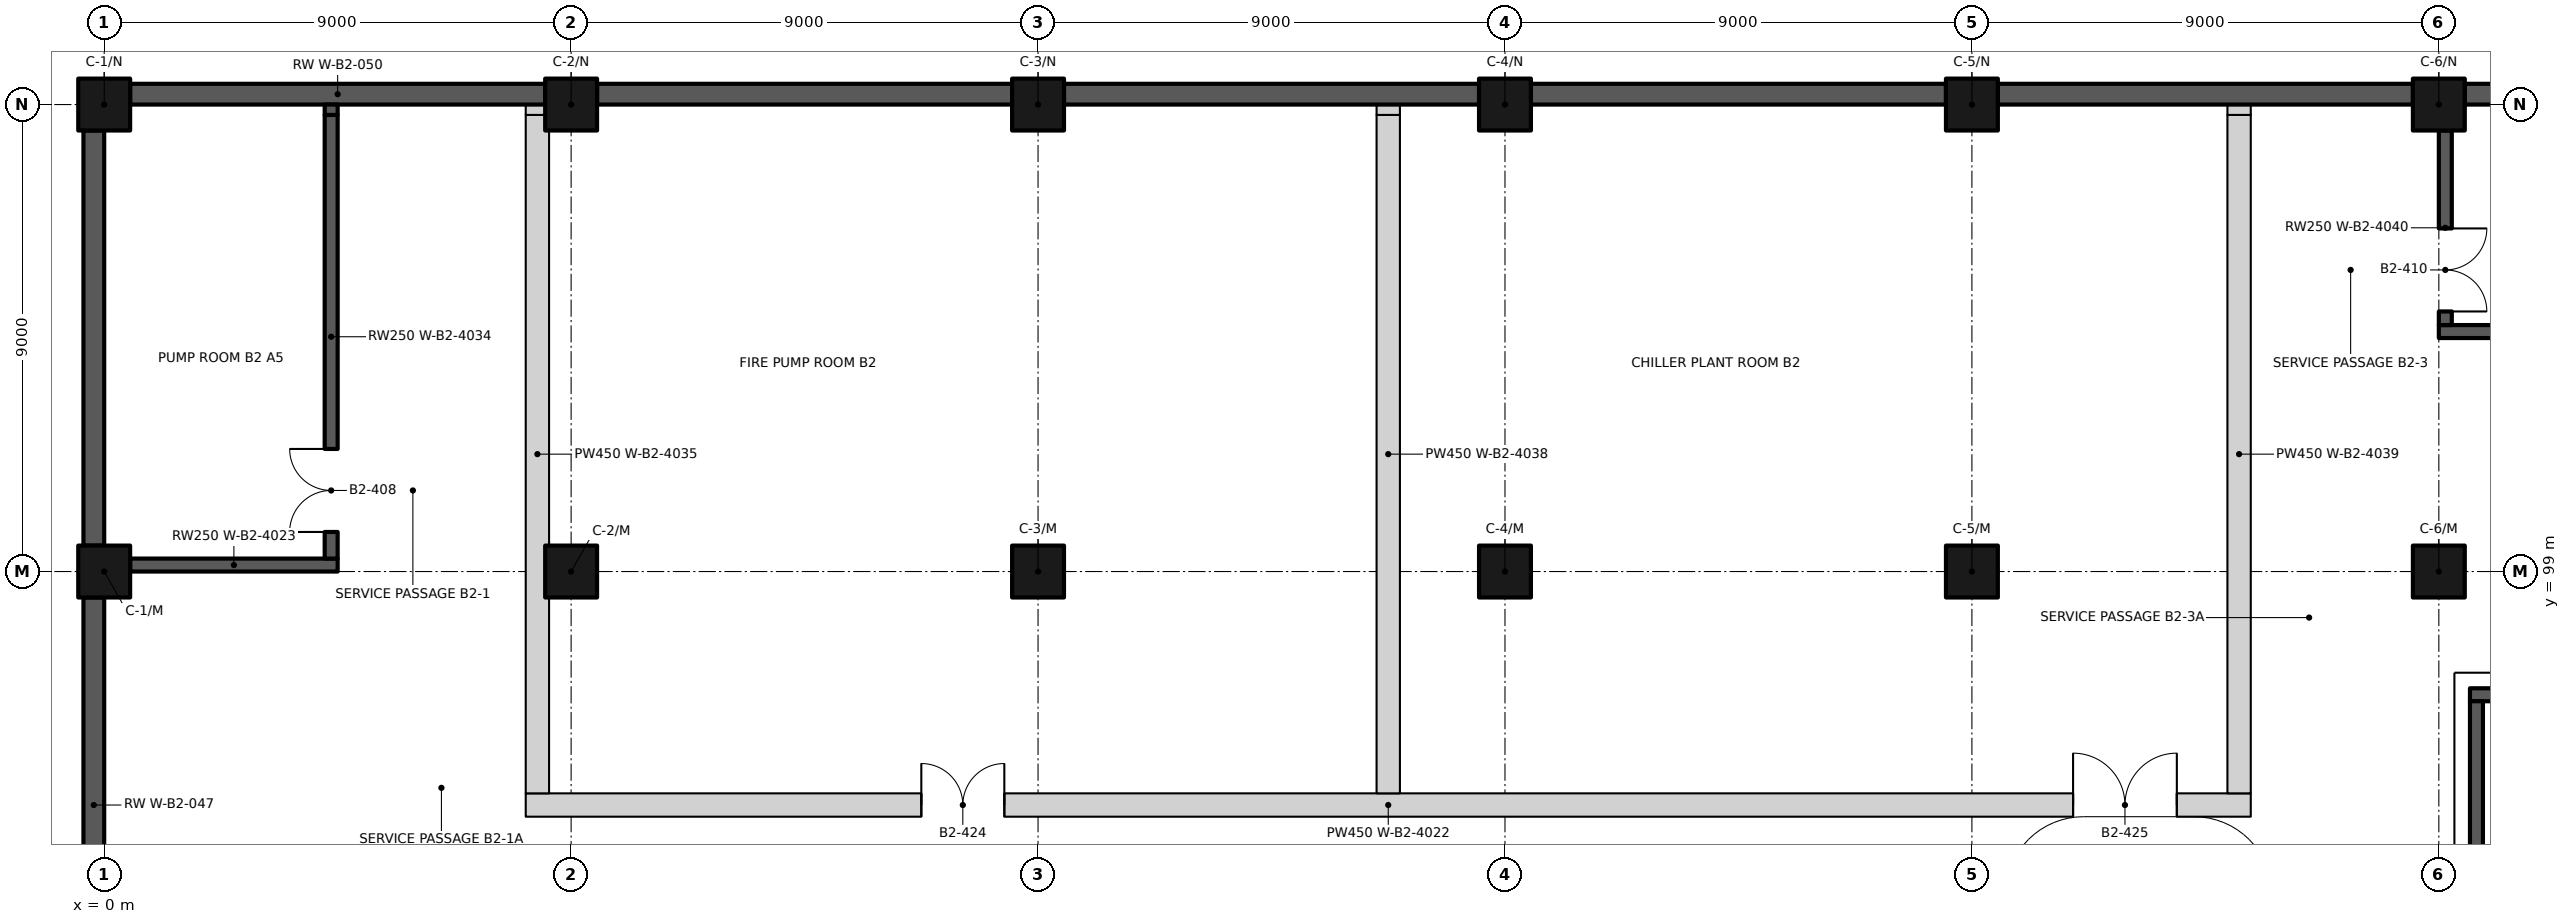
"""IFC4 building model, lengths in metres.
Left out: names, types, materials, properties, quantities, classifications, styles, units other than length and angle.
Written with IfcOpenShell. Run it as: python <this file> out.ifc"""

import sys

from ifc_helpers import new_model, si_unit, direction, frame, frame_2d, origin, origin_2d, place, context, subcontext, project, spatial, rectangle, extrude, element, fill, save


model = new_model("IFC4")
c1 = context("Model", 3, precision=1e-05, world=origin(), true_north=direction((0.0, 1.0)))
c2 = subcontext(c1, "Body", "Model", "MODEL_VIEW")
j1 = project(units=[si_unit("LENGTHUNIT", "METRE"), si_unit("PLANEANGLEUNIT", "RADIAN")], contexts=[c1])
p1 = place(None, origin())
s1 = spatial("IfcSite", under=j1, at=p1, CompositionType="ELEMENT")
p2 = place(p1, origin())
s2 = spatial("IfcBuilding", under=s1, at=p2, CompositionType="ELEMENT")
p3 = place(p2, frame((0.0, 0.0, -9.9)))
s3 = spatial("IfcBuildingStorey", under=s2, at=p3, CompositionType="ELEMENT", Elevation=-9.9)
for number, where, z_axis, x_axis in (
    (1, (-0.2, 90.5, -0.5), (0.0, 0.0, 1.0), (0.0, 1.0, 0.0)),
    (2, (-0.2, 99.5, -0.5), (0.0, 0.0, 1.0), (0.0, 1.0, 0.0)),
    (3, (0.5, 108.2, -0.5), (0.0, 0.0, 1.0), (1.0, 0.0, 0.0)),
    (4, (9.5, 108.2, -0.5), (0.0, 0.0, 1.0), (1.0, 0.0, 0.0)),
    (5, (18.5, 108.2, -0.5), (0.0, 0.0, 1.0), (1.0, 0.0, 0.0)),
    (6, (27.5, 108.2, -0.5), (0.0, 0.0, 1.0), (1.0, 0.0, 0.0)),
    (7, (36.5, 108.2, -0.5), (0.0, 0.0, 1.0), (1.0, 0.0, 0.0)),
    (8, (45.5, 108.2, -0.5), (0.0, 0.0, 1.0), (1.0, 0.0, 0.0)),
):
    element("IfcWall", number, at=place(p3, frame(where, z_axis=z_axis, x_axis=x_axis)), inside=s3, PredefinedType="SOLIDWALL", context=c2, shape_type="SweptSolid", body=[
        extrude(rectangle(XDim=8.0, YDim=0.4, at=frame_2d((4.0, 0.0))), origin(), (0.0, 0.0, 1.0), 5.3),
    ])
for number, where, z_axis, x_axis in (
    (9, (0.0, 99.0, 0.0), (0.0, 0.0, 1.0), (1.0, 0.0, 0.0)),
    (10, (9.0, 99.0, 0.0), (0.0, 0.0, 1.0), (1.0, 0.0, 0.0)),
    (11, (18.0, 99.0, 0.0), (0.0, 0.0, 1.0), (1.0, 0.0, 0.0)),
    (12, (27.0, 99.0, 0.0), (0.0, 0.0, 1.0), (1.0, 0.0, 0.0)),
    (13, (36.0, 99.0, 0.0), (0.0, 0.0, 1.0), (1.0, 0.0, 0.0)),
    (14, (45.0, 99.0, 0.0), (0.0, 0.0, 1.0), (1.0, 0.0, 0.0)),
    (15, (0.0, 108.0, 0.0), (0.0, 0.0, 1.0), (1.0, 0.0, 0.0)),
    (16, (9.0, 108.0, 0.0), (0.0, 0.0, 1.0), (1.0, 0.0, 0.0)),
    (17, (18.0, 108.0, 0.0), (0.0, 0.0, 1.0), (1.0, 0.0, 0.0)),
    (18, (27.0, 108.0, 0.0), (0.0, 0.0, 1.0), (1.0, 0.0, 0.0)),
    (19, (36.0, 108.0, 0.0), (0.0, 0.0, 1.0), (1.0, 0.0, 0.0)),
    (20, (45.0, 108.0, 0.0), (0.0, 0.0, 1.0), (1.0, 0.0, 0.0)),
):
    element("IfcColumn", number, at=place(p3, frame(where, z_axis=z_axis, x_axis=x_axis)), inside=s3, PredefinedType="COLUMN", context=c2, shape_type="SweptSolid", body=[
        extrude(rectangle(XDim=1.0, YDim=1.0, at=origin_2d()), origin(), (0.0, 0.0, 1.0), 4.8),
    ])
p4 = place(p3, frame((45.6, 96.625, -1.6), z_axis=(0.0, 0.0, 1.0), x_axis=(1.0, 0.0, 0.0)))
e21 = element("IfcWall", 21, at=p4, inside=s3, PredefinedType="SHEAR", context=c2, shape_type="SweptSolid", body=[
    extrude(rectangle(XDim=7.15, YDim=0.25, at=frame_2d((3.575, 0.0))), origin(), (0.0, 0.0, 1.0), 6.4),
])
p5 = place(p4, frame((1.15, 0.0, 1.6)))
e22 = element("IfcOpeningElement", 22, at=p5, cuts=e21, PredefinedType="OPENING", context=c2, shape_type="SweptSolid", body=[
    extrude(rectangle(XDim=1.4, YDim=2.1, at=frame_2d((0.7, 1.05))), frame((0.0, 0.135, 0.0), z_axis=(0.0, -1.0, 0.0), x_axis=(1.0, 0.0, 0.0)), (0.0, 0.0, 1.0), 0.27),
])
p6 = place(p4, frame((4.6, 0.0, 1.6)))
e23 = element("IfcOpeningElement", 23, at=p6, cuts=e21, PredefinedType="OPENING", context=c2, shape_type="SweptSolid", body=[
    extrude(rectangle(XDim=1.4, YDim=2.1, at=frame_2d((0.7, 1.05))), frame((0.0, 0.135, 0.0), z_axis=(0.0, -1.0, 0.0), x_axis=(1.0, 0.0, 0.0)), (0.0, 0.0, 1.0), 0.27),
])
p7 = place(p3, frame((45.725, 92.5, -1.6), z_axis=(0.0, 0.0, 1.0), x_axis=(0.0, 1.0, 0.0)))
e24 = element("IfcWall", 24, at=p7, inside=s3, PredefinedType="SHEAR", context=c2, shape_type="SweptSolid", body=[
    extrude(rectangle(XDim=4.0, YDim=0.25, at=frame_2d((2.0, 0.0))), origin(), (0.0, 0.0, 1.0), 6.4),
])
p8 = place(p3, frame((8.125, 94.5, 0.0), z_axis=(0.0, 0.0, 1.0), x_axis=(1.0, 0.0, 0.0)))
e25 = element("IfcWall", 25, at=p8, inside=s3, PredefinedType="SOLIDWALL", context=c2, shape_type="SweptSolid", body=[
    extrude(rectangle(XDim=33.25, YDim=0.45, at=frame_2d((16.625, 0.0))), origin(), (0.0, 0.0, 1.0), 4.5),
])
p9 = place(p8, frame((7.625, 0.0, 0.0)))
e26 = element("IfcOpeningElement", 26, at=p9, cuts=e25, PredefinedType="OPENING", context=c2, shape_type="SweptSolid", body=[
    extrude(rectangle(XDim=1.6, YDim=2.1, at=frame_2d((0.8, 1.05))), frame((0.0, 0.235, 0.0), z_axis=(0.0, -1.0, 0.0), x_axis=(1.0, 0.0, 0.0)), (0.0, 0.0, 1.0), 0.47),
])
p10 = place(p8, frame((29.825, 0.0, 0.0)))
e27 = element("IfcOpeningElement", 27, at=p10, cuts=e25, PredefinedType="OPENING", context=c2, shape_type="SweptSolid", body=[
    extrude(rectangle(XDim=2.0, YDim=2.4, at=frame_2d((1.0, 1.2))), frame((0.0, 0.235, 0.0), z_axis=(0.0, -1.0, 0.0), x_axis=(1.0, 0.0, 0.0)), (0.0, 0.0, 1.0), 0.47),
])
p11 = place(p3, frame((0.5, 99.125, 0.0), z_axis=(0.0, 0.0, 1.0), x_axis=(1.0, 0.0, 0.0)))
e28 = element("IfcWall", 28, at=p11, inside=s3, PredefinedType="SOLIDWALL", context=c2, shape_type="SweptSolid", body=[
    extrude(rectangle(XDim=4.0, YDim=0.25, at=frame_2d((2.0, 0.0))), origin(), (0.0, 0.0, 1.0), 4.5),
])
p12 = place(p3, frame((45.0, 103.625, 0.0), z_axis=(0.0, 0.0, 1.0), x_axis=(1.0, 0.0, 0.0)))
e29 = element("IfcWall", 29, at=p12, inside=s3, PredefinedType="SOLIDWALL", context=c2, shape_type="SweptSolid", body=[
    extrude(rectangle(XDim=9.0, YDim=0.25, at=frame_2d((4.5, 0.0))), origin(), (0.0, 0.0, 1.0), 4.5),
])
p13 = place(p3, frame((4.375, 99.25, 0.0), z_axis=(0.0, 0.0, 1.0), x_axis=(0.0, 1.0, 0.0)))
e30 = element("IfcWall", 30, at=p13, inside=s3, PredefinedType="SOLIDWALL", context=c2, shape_type="SweptSolid", body=[
    extrude(rectangle(XDim=8.55, YDim=0.25, at=frame_2d((4.275, 0.0))), origin(), (0.0, 0.0, 1.0), 4.5),
])
p14 = place(p13, frame((0.512, 0.0, 0.0)))
e31 = element("IfcOpeningElement", 31, at=p14, cuts=e30, PredefinedType="OPENING", context=c2, shape_type="SweptSolid", body=[
    extrude(rectangle(XDim=1.6, YDim=2.1, at=frame_2d((0.8, 1.05))), frame((0.0, 0.135, 0.0), z_axis=(0.0, -1.0, 0.0), x_axis=(1.0, 0.0, 0.0)), (0.0, 0.0, 1.0), 0.27),
])
p15 = place(p3, frame((4.375, 107.8, 0.0), z_axis=(0.0, 0.0, 1.0), x_axis=(0.0, 1.0, 0.0)))
e32 = element("IfcWall", 32, at=p15, inside=s3, PredefinedType="SOLIDWALL", context=c2, shape_type="SweptSolid", body=[
    extrude(rectangle(XDim=0.2, YDim=0.25, at=frame_2d((0.1, 0.0))), origin(), (0.0, 0.0, 1.0), 4.0),
])
p16 = place(p3, frame((8.35, 94.725, 0.0), z_axis=(0.0, 0.0, 1.0), x_axis=(0.0, 1.0, 0.0)))
e33 = element("IfcWall", 33, at=p16, inside=s3, PredefinedType="SOLIDWALL", context=c2, shape_type="SweptSolid", body=[
    extrude(rectangle(XDim=13.075, YDim=0.45, at=frame_2d((6.538, 0.0))), origin(), (0.0, 0.0, 1.0), 4.5),
])
p17 = place(p3, frame((8.35, 107.8, 0.0), z_axis=(0.0, 0.0, 1.0), x_axis=(0.0, 1.0, 0.0)))
e34 = element("IfcWall", 34, at=p17, inside=s3, PredefinedType="SOLIDWALL", context=c2, shape_type="SweptSolid", body=[
    extrude(rectangle(XDim=0.2, YDim=0.45, at=frame_2d((0.1, 0.0))), origin(), (0.0, 0.0, 1.0), 4.0),
])
p18 = place(p3, frame((24.75, 94.725, 0.0), z_axis=(0.0, 0.0, 1.0), x_axis=(0.0, 1.0, 0.0)))
e35 = element("IfcWall", 35, at=p18, inside=s3, PredefinedType="SOLIDWALL", context=c2, shape_type="SweptSolid", body=[
    extrude(rectangle(XDim=13.075, YDim=0.45, at=frame_2d((6.538, 0.0))), origin(), (0.0, 0.0, 1.0), 4.5),
])
p19 = place(p3, frame((24.75, 107.8, 0.0), z_axis=(0.0, 0.0, 1.0), x_axis=(0.0, 1.0, 0.0)))
e36 = element("IfcWall", 36, at=p19, inside=s3, PredefinedType="SOLIDWALL", context=c2, shape_type="SweptSolid", body=[
    extrude(rectangle(XDim=0.2, YDim=0.45, at=frame_2d((0.1, 0.0))), origin(), (0.0, 0.0, 1.0), 4.0),
])
p20 = place(p3, frame((41.15, 94.725, 0.0), z_axis=(0.0, 0.0, 1.0), x_axis=(0.0, 1.0, 0.0)))
e37 = element("IfcWall", 37, at=p20, inside=s3, PredefinedType="SOLIDWALL", context=c2, shape_type="SweptSolid", body=[
    extrude(rectangle(XDim=13.075, YDim=0.45, at=frame_2d((6.538, 0.0))), origin(), (0.0, 0.0, 1.0), 4.5),
])
p21 = place(p3, frame((41.15, 107.8, 0.0), z_axis=(0.0, 0.0, 1.0), x_axis=(0.0, 1.0, 0.0)))
e38 = element("IfcWall", 38, at=p21, inside=s3, PredefinedType="SOLIDWALL", context=c2, shape_type="SweptSolid", body=[
    extrude(rectangle(XDim=0.2, YDim=0.45, at=frame_2d((0.1, 0.0))), origin(), (0.0, 0.0, 1.0), 4.0),
])
p22 = place(p3, frame((45.125, 103.75, 0.0), z_axis=(0.0, 0.0, 1.0), x_axis=(0.0, 1.0, 0.0)))
e39 = element("IfcWall", 39, at=p22, inside=s3, PredefinedType="SOLIDWALL", context=c2, shape_type="SweptSolid", body=[
    extrude(rectangle(XDim=3.75, YDim=0.25, at=frame_2d((1.875, 0.0))), origin(), (0.0, 0.0, 1.0), 4.5),
])
p23 = place(p22, frame((1.863, 0.0, 0.0), z_axis=(0.0, 0.0, 1.0), x_axis=(-1.0, 0.0, 0.0)))
e40 = element("IfcOpeningElement", 40, at=p23, cuts=e39, PredefinedType="OPENING", context=c2, shape_type="SweptSolid", body=[
    extrude(rectangle(XDim=1.6, YDim=2.1, at=frame_2d((0.8, 1.05))), frame((0.0, 0.135, 0.0), z_axis=(0.0, -1.0, 0.0), x_axis=(1.0, 0.0, 0.0)), (0.0, 0.0, 1.0), 0.27),
])
p24 = place(p14, origin())
e41 = element("IfcDoor", 41, at=p24, inside=s3, OperationType="DOUBLE_DOOR_SINGLE_SWING", PredefinedType="DOOR", context=c2, shape_type="SweptSolid", body=[
    extrude(rectangle(XDim=1.6, YDim=2.1, at=frame_2d((0.8, 1.05))), frame((0.0, 0.025, 0.0), z_axis=(0.0, -1.0, 0.0), x_axis=(1.0, 0.0, 0.0)), (0.0, 0.0, 1.0), 0.05),
])
fill(e31, e41)
p25 = place(p23, origin())
e42 = element("IfcDoor", 42, at=p25, inside=s3, OperationType="DOUBLE_DOOR_SINGLE_SWING", PredefinedType="DOOR", context=c2, shape_type="SweptSolid", body=[
    extrude(rectangle(XDim=1.6, YDim=2.1, at=frame_2d((0.8, 1.05))), frame((0.0, 0.025, 0.0), z_axis=(0.0, -1.0, 0.0), x_axis=(1.0, 0.0, 0.0)), (0.0, 0.0, 1.0), 0.05),
])
fill(e40, e42)
p26 = place(p9, origin())
e43 = element("IfcDoor", 43, at=p26, inside=s3, OperationType="DOUBLE_DOOR_SINGLE_SWING", PredefinedType="DOOR", context=c2, shape_type="SweptSolid", body=[
    extrude(rectangle(XDim=1.6, YDim=2.1, at=frame_2d((0.8, 1.05))), frame((0.0, 0.025, 0.0), z_axis=(0.0, -1.0, 0.0), x_axis=(1.0, 0.0, 0.0)), (0.0, 0.0, 1.0), 0.05),
])
fill(e26, e43)
p27 = place(p10, origin())
e44 = element("IfcDoor", 44, at=p27, inside=s3, OperationType="DOUBLE_DOOR_SINGLE_SWING", PredefinedType="DOOR", context=c2, shape_type="SweptSolid", body=[
    extrude(rectangle(XDim=2.0, YDim=2.4, at=frame_2d((1.0, 1.2))), frame((0.0, 0.025, 0.0), z_axis=(0.0, -1.0, 0.0), x_axis=(1.0, 0.0, 0.0)), (0.0, 0.0, 1.0), 0.05),
])
fill(e27, e44)
save(model, sys.argv[1])
